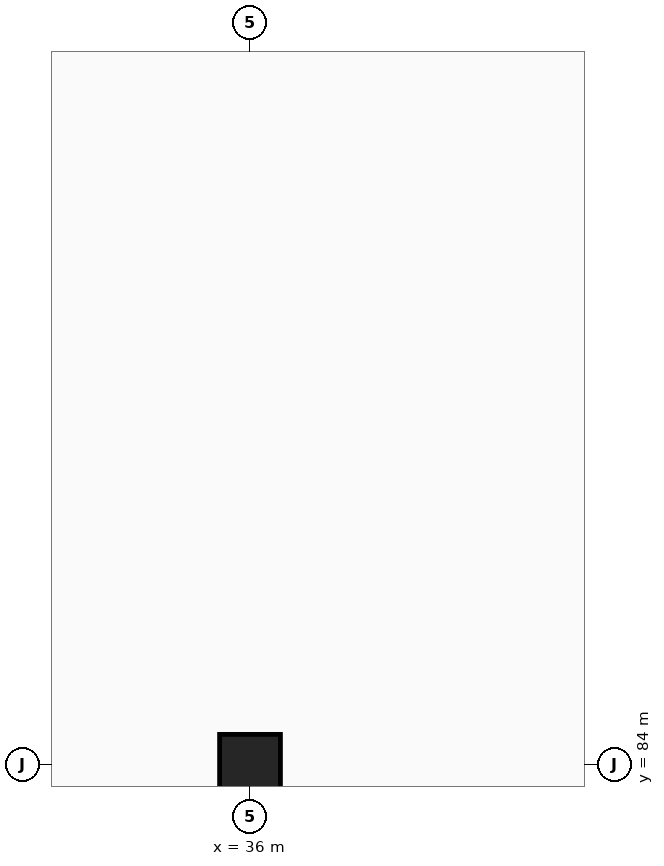
"""IFC4 building model, lengths in metres.
Left out: names, types, materials, properties, quantities, classifications, styles, units other than length and angle.
Written with IfcOpenShell. Run it as: python <this file> out.ifc"""

import sys

from ifc_helpers import new_model, si_unit, direction, frame, origin, origin_2d, place, context, subcontext, project, spatial, rectangle, extrude, element, save


model = new_model("IFC4")
c1 = context("Model", 3, precision=1e-05, world=origin(), true_north=direction((0.0, 1.0)))
c2 = subcontext(c1, "Body", "Model", "MODEL_VIEW")
j1 = project(units=[si_unit("LENGTHUNIT", "METRE"), si_unit("PLANEANGLEUNIT", "RADIAN")], contexts=[c1])
p1 = place(None, origin())
s1 = spatial("IfcSite", under=j1, at=p1, CompositionType="ELEMENT")
p2 = place(p1, origin())
s2 = spatial("IfcBuilding", under=s1, at=p2, CompositionType="ELEMENT")
p3 = place(p2, frame((0.0, 0.0, -5.1)))
s3 = spatial("IfcBuildingStorey", under=s2, at=p3, CompositionType="ELEMENT", Elevation=-5.1)
p4 = place(p3, frame((36.0, 84.0, 0.0), z_axis=(0.0, 0.0, 1.0), x_axis=(1.0, 0.0, 0.0)))
e1 = element("IfcColumn", 1, at=p4, inside=s3, PredefinedType="COLUMN", context=c2, shape_type="SweptSolid", body=[
    extrude(rectangle(XDim=0.8, YDim=0.8, at=origin_2d()), origin(), (0.0, 0.0, 1.0), 5.1),
])
save(model, sys.argv[1])
